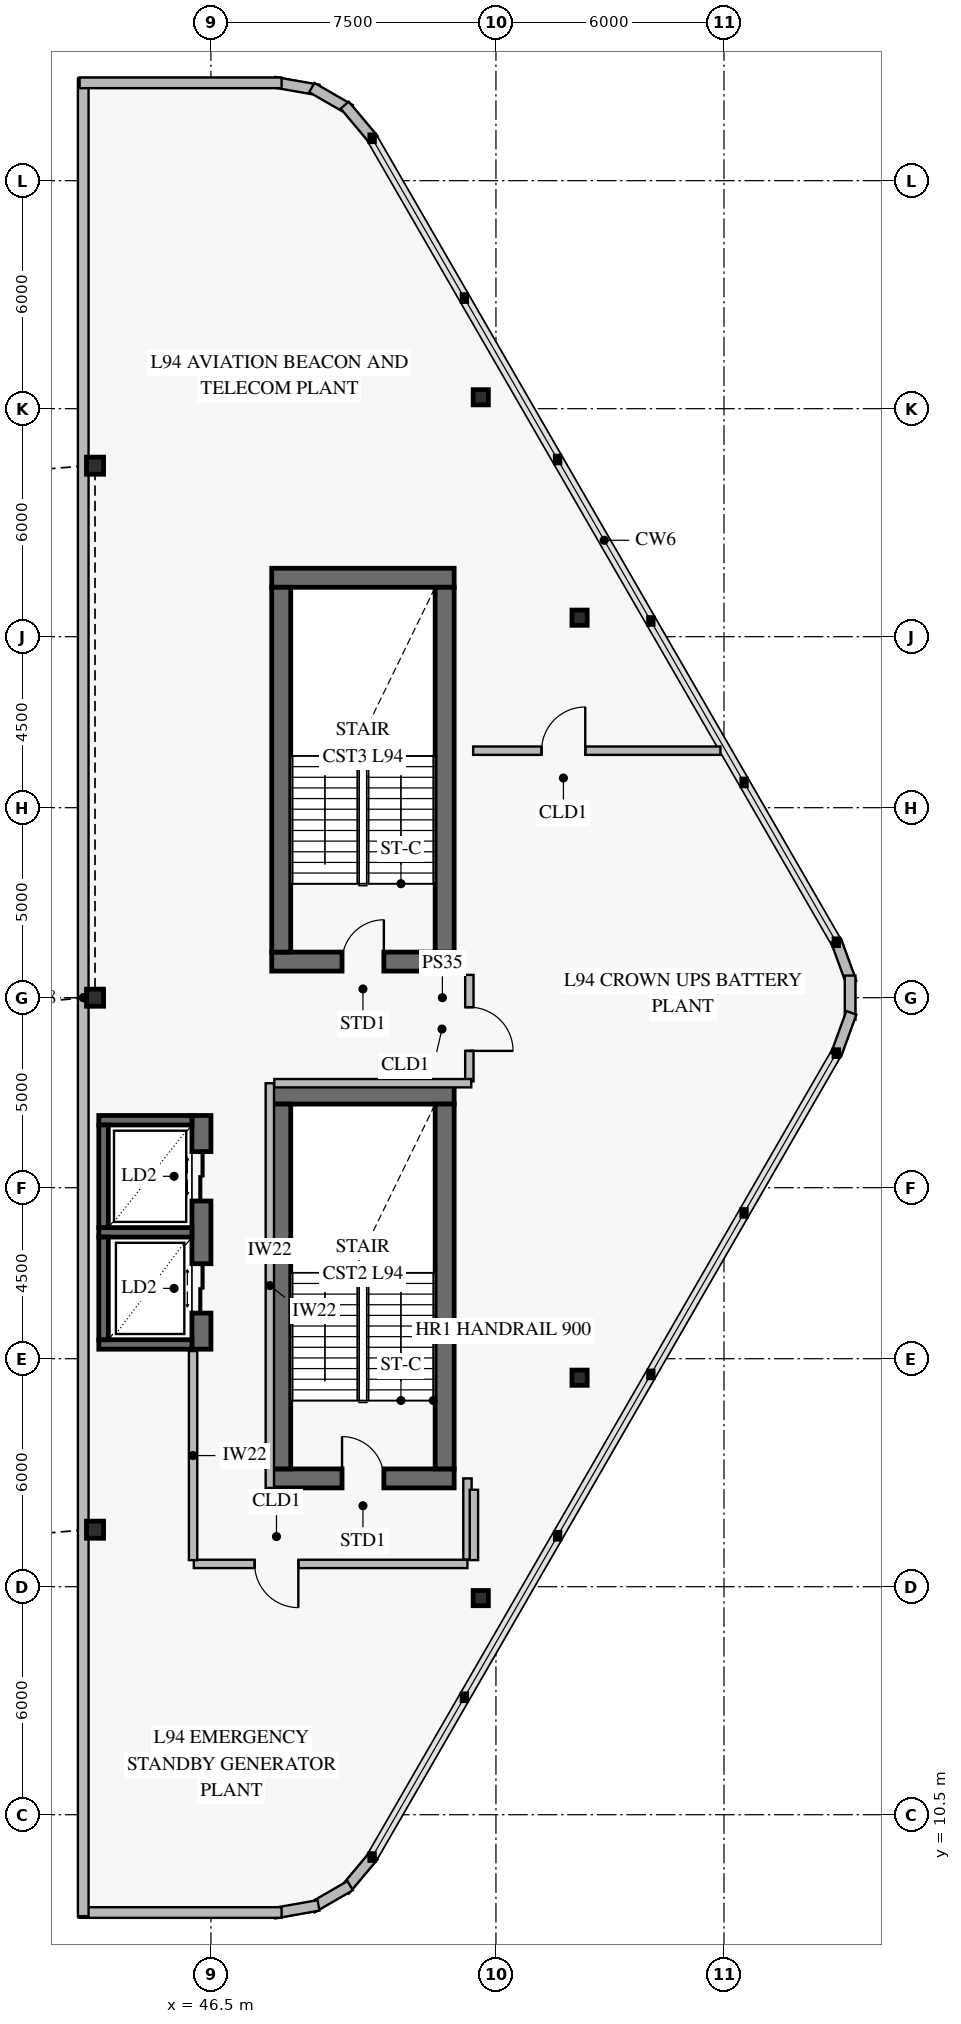
"""IFC4 building model, lengths in metres.
Left out: names, types, materials, properties, quantities, classifications, styles, units other than length and angle.
Written with IfcOpenShell. Run it as: python <this file> out.ifc"""

import sys

from ifc_helpers import new_model, si_unit, direction, frame, frame_2d, origin, origin_2d, place, context, subcontext, project, spatial, rectangle, hollow_rectangle, i_section, extrude, element, fill, save


model = new_model("IFC4")
c1 = context("Model", 3, precision=1e-05, world=origin(), true_north=direction((0.0, 1.0)))
c2 = subcontext(c1, "Body", "Model", "MODEL_VIEW")
j1 = project(units=[si_unit("LENGTHUNIT", "METRE"), si_unit("PLANEANGLEUNIT", "RADIAN")], contexts=[c1])
p1 = place(None, origin())
s1 = spatial("IfcSite", under=j1, at=p1, CompositionType="ELEMENT")
p2 = place(p1, origin())
s2 = spatial("IfcBuilding", under=s1, at=p2, CompositionType="ELEMENT")
p3 = place(p2, frame((0.0, 0.0, 370.2)))
s3 = spatial("IfcBuildingStorey", under=s2, at=p3, CompositionType="ELEMENT", Elevation=370.2)
p4 = place(p3, frame((48.1, 19.35, 0.0), z_axis=(0.0, 0.0, 1.0), x_axis=(1.0, 0.0, 0.0)))
e1 = element("IfcWall", 1, at=p4, inside=s3, PredefinedType="SHEAR", context=c2, shape_type="SweptSolid", body=[
    extrude(rectangle(XDim=4.8, YDim=0.5, at=frame_2d((2.4, 0.0))), origin(), (0.0, 0.0, 1.0), 4.4),
])
p5 = place(p4, frame((1.85, 0.0, 0.0)))
e2 = element("IfcOpeningElement", 2, at=p5, cuts=e1, PredefinedType="OPENING", context=c2, shape_type="SweptSolid", body=[
    extrude(rectangle(XDim=1.1, YDim=2.15, at=frame_2d((0.55, 1.075))), frame((0.0, 0.262, 0.0), z_axis=(0.0, -1.0, 0.0), x_axis=(1.0, 0.0, 0.0)), (0.0, 0.0, 1.0), 0.524),
])
p6 = place(p3, frame((52.9, 29.45, 0.0), z_axis=(0.0, 0.0, 1.0), x_axis=(-1.0, 0.0, 0.0)))
e3 = element("IfcWall", 3, at=p6, inside=s3, PredefinedType="SHEAR", context=c2, shape_type="SweptSolid", body=[
    extrude(rectangle(XDim=4.8, YDim=0.5, at=frame_2d((2.4, 0.0))), origin(), (0.0, 0.0, 1.0), 4.4),
])
for number, where, z_axis, x_axis in (
    (4, (48.35, 19.6, 0.0), (0.0, 0.0, 1.0), (0.0, 1.0, 0.0)),
    (5, (52.65, 29.2, 0.0), (0.0, 0.0, 1.0), (0.0, -1.0, 0.0)),
):
    element("IfcWall", number, at=place(p3, frame(where, z_axis=z_axis, x_axis=x_axis)), inside=s3, PredefinedType="SHEAR", context=c2, shape_type="SweptSolid", body=[
        extrude(rectangle(XDim=9.6, YDim=0.5, at=frame_2d((4.8, 0.0))), origin(), (0.0, 0.0, 1.0), 4.4),
    ])
p7 = place(p3, frame((48.1, 32.95, 0.0), z_axis=(0.0, 0.0, 1.0), x_axis=(1.0, 0.0, 0.0)))
e6 = element("IfcWall", 6, at=p7, inside=s3, PredefinedType="SHEAR", context=c2, shape_type="SweptSolid", body=[
    extrude(rectangle(XDim=4.8, YDim=0.5, at=frame_2d((2.4, 0.0))), origin(), (0.0, 0.0, 1.0), 4.4),
])
p8 = place(p7, frame((1.85, 0.0, 0.0)))
e7 = element("IfcOpeningElement", 7, at=p8, cuts=e6, PredefinedType="OPENING", context=c2, shape_type="SweptSolid", body=[
    extrude(rectangle(XDim=1.1, YDim=2.15, at=frame_2d((0.55, 1.075))), frame((0.0, 0.262, 0.0), z_axis=(0.0, -1.0, 0.0), x_axis=(1.0, 0.0, 0.0)), (0.0, 0.0, 1.0), 0.524),
])
p9 = place(p3, frame((52.9, 43.05, 0.0), z_axis=(0.0, 0.0, 1.0), x_axis=(-1.0, 0.0, 0.0)))
e8 = element("IfcWall", 8, at=p9, inside=s3, PredefinedType="SHEAR", context=c2, shape_type="SweptSolid", body=[
    extrude(rectangle(XDim=4.8, YDim=0.5, at=frame_2d((2.4, 0.0))), origin(), (0.0, 0.0, 1.0), 4.4),
])
for number, where, z_axis, x_axis in (
    (9, (48.35, 33.2, 0.0), (0.0, 0.0, 1.0), (0.0, 1.0, 0.0)),
    (10, (52.65, 42.8, 0.0), (0.0, 0.0, 1.0), (0.0, -1.0, 0.0)),
):
    element("IfcWall", number, at=place(p3, frame(where, z_axis=z_axis, x_axis=x_axis)), inside=s3, PredefinedType="SHEAR", context=c2, shape_type="SweptSolid", body=[
        extrude(rectangle(XDim=9.6, YDim=0.5, at=frame_2d((4.8, 0.0))), origin(), (0.0, 0.0, 1.0), 4.4),
    ])
p10 = place(p3, frame((46.25, 22.75, 0.0), z_axis=(0.0, 0.0, 1.0), x_axis=(0.0, 1.0, 0.0)))
e11 = element("IfcWall", 11, at=p10, inside=s3, PredefinedType="SHEAR", context=c2, shape_type="SweptSolid", body=[
    extrude(rectangle(XDim=6.15, YDim=0.5, at=frame_2d((3.075, 0.0))), origin(), (0.0, 0.0, 1.0), 4.4),
])
p11 = place(p10, frame((0.95, 0.0, 0.0)))
e12 = element("IfcOpeningElement", 12, at=p11, cuts=e11, PredefinedType="OPENING", context=c2, shape_type="SweptSolid", body=[
    extrude(rectangle(XDim=1.3, YDim=2.3, at=frame_2d((0.65, 1.15))), frame((0.0, 0.262, 0.0), z_axis=(0.0, -1.0, 0.0), x_axis=(1.0, 0.0, 0.0)), (0.0, 0.0, 1.0), 0.524),
])
p12 = place(p10, frame((3.9, 0.0, 0.0)))
e13 = element("IfcOpeningElement", 13, at=p12, cuts=e11, PredefinedType="OPENING", context=c2, shape_type="SweptSolid", body=[
    extrude(rectangle(XDim=1.3, YDim=2.3, at=frame_2d((0.65, 1.15))), frame((0.0, 0.262, 0.0), z_axis=(0.0, -1.0, 0.0), x_axis=(1.0, 0.0, 0.0)), (0.0, 0.0, 1.0), 0.524),
])
for number, where, z_axis, x_axis in (
    (14, (56.2, 22.0, 0.0), (0.0, 0.0, 1.0), (1.0, 0.0, 0.0)),
    (15, (56.2, 42.0, 0.0), (0.0, 0.0, 1.0), (1.0, 0.0, 0.0)),
    (16, (53.6, 16.2, 0.0), (0.0, 0.0, 1.0), (1.0, 0.0, 0.0)),
    (17, (53.6, 47.8, 0.0), (0.0, 0.0, 1.0), (1.0, 0.0, 0.0)),
):
    element("IfcColumn", number, at=place(p3, frame(where, z_axis=z_axis, x_axis=x_axis)), inside=s3, PredefinedType="COLUMN", context=c2, shape_type="SweptSolid", body=[
        extrude(i_section(OverallWidth=0.4, OverallDepth=0.4, WebThickness=0.013, FlangeThickness=0.021, at=origin_2d()), origin(), (0.0, 0.0, 1.0), 4.05),
    ])
for number, where, z_axis, x_axis in (
    (18, (43.45, 18.0, 0.0), (0.0, 0.0, 1.0), (1.0, 0.0, 0.0)),
    (19, (43.45, 32.0, 0.0), (0.0, 0.0, 1.0), (1.0, 0.0, 0.0)),
    (20, (43.45, 46.0, 0.0), (0.0, 0.0, 1.0), (1.0, 0.0, 0.0)),
):
    element("IfcColumn", number, at=place(p3, frame(where, z_axis=z_axis, x_axis=x_axis)), inside=s3, PredefinedType="PILASTER", context=c2, shape_type="SweptSolid", body=[
        extrude(hollow_rectangle(XDim=0.45, YDim=0.45, WallThickness=0.022, at=origin_2d()), origin(), (0.0, 0.0, 1.0), 4.05),
    ])
p13 = place(p3, frame((48.171, 56.091, 0.0), z_axis=(0.0, 0.0, 1.0), x_axis=(0.984798162481, -0.173702559495, 0.0)))
e21 = element("IfcWall", 21, at=p13, inside=s3, PredefinedType="SOLIDWALL", context=c2, shape_type="SweptSolid", body=[
    extrude(rectangle(XDim=1.178, YDim=0.28, at=frame_2d((0.589, 0.0))), origin(), (0.0, 0.0, 1.0), 4.05),
])
p14 = place(p3, frame((49.155, 55.95, 0.0), z_axis=(0.0, 0.0, 1.0), x_axis=(0.865951785477, -0.500127488975, 0.0)))
e22 = element("IfcWall", 22, at=p14, inside=s3, PredefinedType="SOLIDWALL", context=c2, shape_type="SweptSolid", body=[
    extrude(rectangle(XDim=1.165, YDim=0.28, at=frame_2d((0.583, 0.0))), origin(), (0.0, 0.0, 1.0), 4.05),
])
for number, where, z_axis, x_axis in (
    (23, (50.021, 55.488, 0.0), (0.0, 0.0, 1.0), (0.643, -0.766, 0.0)),
    (24, (62.948, 33.505, 0.0), (0.0, 0.0, 1.0), (0.342, -0.94, 0.0)),
):
    element("IfcWall", number, at=place(p3, frame(where, z_axis=z_axis, x_axis=x_axis)), inside=s3, PredefinedType="SOLIDWALL", context=c2, shape_type="SweptSolid", body=[
        extrude(rectangle(XDim=1.178, YDim=0.28, at=frame_2d((0.589, 0.0))), origin(), (0.0, 0.0, 1.0), 4.05),
    ])
p15 = place(p3, frame((63.319, 32.583, 0.0), z_axis=(0.0, 0.0, 1.0), x_axis=(0.0, -1.0, 0.0)))
e25 = element("IfcWall", 25, at=p15, inside=s3, PredefinedType="SOLIDWALL", context=c2, shape_type="SweptSolid", body=[
    extrude(rectangle(XDim=1.165, YDim=0.28, at=frame_2d((0.583, 0.0))), origin(), (0.0, 0.0, 1.0), 4.05),
])
for number, where, z_axis, x_axis in (
    (26, (63.351, 31.602, 0.0), (0.0, 0.0, 1.0), (-0.342, -0.94, 0.0)),
    (27, (50.778, 9.414, 0.0), (0.0, 0.0, 1.0), (-0.643, -0.766, 0.0)),
):
    element("IfcWall", number, at=place(p3, frame(where, z_axis=z_axis, x_axis=x_axis)), inside=s3, PredefinedType="SOLIDWALL", context=c2, shape_type="SweptSolid", body=[
        extrude(rectangle(XDim=1.178, YDim=0.28, at=frame_2d((0.589, 0.0))), origin(), (0.0, 0.0, 1.0), 4.05),
    ])
p16 = place(p3, frame((50.164, 8.633, 0.0), z_axis=(0.0, 0.0, 1.0), x_axis=(-0.865951785477, -0.500127488975, 0.0)))
e28 = element("IfcWall", 28, at=p16, inside=s3, PredefinedType="SOLIDWALL", context=c2, shape_type="SweptSolid", body=[
    extrude(rectangle(XDim=1.165, YDim=0.28, at=frame_2d((0.583, 0.0))), origin(), (0.0, 0.0, 1.0), 4.05),
])
p17 = place(p3, frame((49.331, 8.114, 0.0), z_axis=(0.0, 0.0, 1.0), x_axis=(-0.984798162481, -0.173702559495, 0.0)))
e29 = element("IfcWall", 29, at=p17, inside=s3, PredefinedType="SOLIDWALL", context=c2, shape_type="SweptSolid", body=[
    extrude(rectangle(XDim=1.178, YDim=0.28, at=frame_2d((0.589, 0.0))), origin(), (0.0, 0.0, 1.0), 4.05),
])
p18 = place(p3, frame((48.36, 7.926, 0.0), z_axis=(0.0, 0.0, 1.0), x_axis=(-1.0, 0.0, 0.0)))
e30 = element("IfcWall", 30, at=p18, inside=s3, PredefinedType="SOLIDWALL", context=c2, shape_type="SweptSolid", body=[
    extrude(rectangle(XDim=5.315, YDim=0.28, at=frame_2d((2.657, 0.0))), origin(), (0.0, 0.0, 1.0), 4.05),
])
p19 = place(p3, frame((43.14, 7.831, 0.0), z_axis=(0.0, 0.0, 1.0), x_axis=(0.0, 1.0, 0.0)))
e31 = element("IfcWall", 31, at=p19, inside=s3, PredefinedType="SOLIDWALL", context=c2, shape_type="SweptSolid", body=[
    extrude(rectangle(XDim=48.338, YDim=0.28, at=frame_2d((24.169, 0.0))), origin(), (0.0, 0.0, 1.0), 3.465),
])
p20 = place(p3, frame((43.045, 56.074, 0.0), z_axis=(0.0, 0.0, 1.0), x_axis=(1.0, 0.0, 0.0)))
e32 = element("IfcWall", 32, at=p20, inside=s3, PredefinedType="SOLIDWALL", context=c2, shape_type="SweptSolid", body=[
    extrude(rectangle(XDim=5.315, YDim=0.28, at=frame_2d((2.657, 0.0))), origin(), (0.0, 0.0, 1.0), 4.05),
])
for number, where, z_axis, x_axis in (
    (33, (43.55, 22.875, 0.0), (0.0, 0.0, 1.0), (1.0, 0.0, 0.0)),
    (34, (43.55, 25.825, 0.0), (0.0, 0.0, 1.0), (1.0, 0.0, 0.0)),
):
    element("IfcWall", number, at=place(p3, frame(where, z_axis=z_axis, x_axis=x_axis)), inside=s3, PredefinedType="SOLIDWALL", context=c2, shape_type="SweptSolid", body=[
        extrude(rectangle(XDim=2.45, YDim=0.25, at=frame_2d((1.225, 0.0))), origin(), (0.0, 0.0, 1.0), 4.4),
    ])
p21 = place(p3, frame((43.675, 23.0, 0.0), z_axis=(0.0, 0.0, 1.0), x_axis=(0.0, 1.0, 0.0)))
e35 = element("IfcWall", 35, at=p21, inside=s3, PredefinedType="SOLIDWALL", context=c2, shape_type="SweptSolid", body=[
    extrude(rectangle(XDim=2.7, YDim=0.25, at=frame_2d((1.35, 0.0))), origin(), (0.0, 0.0, 1.0), 4.4),
])
p22 = place(p3, frame((43.55, 28.775, 0.0), z_axis=(0.0, 0.0, 1.0), x_axis=(1.0, 0.0, 0.0)))
e36 = element("IfcWall", 36, at=p22, inside=s3, PredefinedType="SOLIDWALL", context=c2, shape_type="SweptSolid", body=[
    extrude(rectangle(XDim=2.45, YDim=0.25, at=frame_2d((1.225, 0.0))), origin(), (0.0, 0.0, 1.0), 4.4),
])
p23 = place(p3, frame((43.675, 25.95, 0.0), z_axis=(0.0, 0.0, 1.0), x_axis=(0.0, 1.0, 0.0)))
e37 = element("IfcWall", 37, at=p23, inside=s3, PredefinedType="SOLIDWALL", context=c2, shape_type="SweptSolid", body=[
    extrude(rectangle(XDim=2.7, YDim=0.25, at=frame_2d((1.35, 0.0))), origin(), (0.0, 0.0, 1.0), 4.4),
])
p24 = place(p3, frame((53.4, 38.5, 0.0), z_axis=(0.0, 0.0, 1.0), x_axis=(1.0, 0.0, 0.0)))
e38 = element("IfcWall", 38, at=p24, inside=s3, PredefinedType="PARTITIONING", context=c2, shape_type="SweptSolid", body=[
    extrude(rectangle(XDim=6.507, YDim=0.22, at=frame_2d((3.253, 0.0))), origin(), (0.0, 0.0, 1.0), 3.47),
])
p25 = place(p24, frame((1.8, 0.0, 0.0)))
e39 = element("IfcOpeningElement", 39, at=p25, cuts=e38, PredefinedType="OPENING", context=c2, shape_type="SweptSolid", body=[
    extrude(rectangle(XDim=1.15, YDim=2.2, at=frame_2d((0.575, 1.1))), frame((0.0, 0.122, 0.0), z_axis=(0.0, -1.0, 0.0), x_axis=(1.0, 0.0, 0.0)), (0.0, 0.0, 1.0), 0.244),
])
p26 = place(p3, frame((46.05, 17.1, 0.0), z_axis=(0.0, 0.0, 1.0), x_axis=(1.0, 0.0, 0.0)))
e40 = element("IfcWall", 40, at=p26, inside=s3, PredefinedType="PARTITIONING", context=c2, shape_type="SweptSolid", body=[
    extrude(rectangle(XDim=7.2, YDim=0.22, at=frame_2d((3.6, 0.0))), origin(), (0.0, 0.0, 1.0), 3.47),
])
p27 = place(p26, frame((1.6, 0.0, 0.0)))
e41 = element("IfcOpeningElement", 41, at=p27, cuts=e40, PredefinedType="OPENING", context=c2, shape_type="SweptSolid", body=[
    extrude(rectangle(XDim=1.15, YDim=2.2, at=frame_2d((0.575, 1.1))), frame((0.0, 0.122, 0.0), z_axis=(0.0, -1.0, 0.0), x_axis=(1.0, 0.0, 0.0)), (0.0, 0.0, 1.0), 0.244),
])
p28 = place(p3, frame((53.3, 29.8, 0.0), z_axis=(0.0, 0.0, 1.0), x_axis=(0.0, 1.0, 0.0)))
e42 = element("IfcWall", 42, at=p28, inside=s3, PredefinedType="PARTITIONING", context=c2, shape_type="SweptSolid", body=[
    extrude(rectangle(XDim=2.8, YDim=0.22, at=frame_2d((1.4, 0.0))), origin(), (0.0, 0.0, 1.0), 4.05),
])
p29 = place(p28, frame((0.8, 0.0, 0.0)))
e43 = element("IfcOpeningElement", 43, at=p29, cuts=e42, PredefinedType="OPENING", context=c2, shape_type="SweptSolid", body=[
    extrude(rectangle(XDim=1.15, YDim=2.2, at=frame_2d((0.575, 1.1))), frame((0.0, 0.122, 0.0), z_axis=(0.0, -1.0, 0.0), x_axis=(1.0, 0.0, 0.0)), (0.0, 0.0, 1.0), 0.244),
])
p30 = place(p3, frame((53.25, 17.218, 0.0), z_axis=(0.0, 0.0, 1.0), x_axis=(0.0, 1.0, 0.0)))
e44 = element("IfcWall", 44, at=p30, inside=s3, PredefinedType="PARTITIONING", context=c2, shape_type="SweptSolid", body=[
    extrude(rectangle(XDim=2.132, YDim=0.22, at=frame_2d((1.066, 0.0))), origin(), (0.0, 0.0, 1.0), 4.05),
])
p31 = place(p3, frame((48.05, 19.1, 0.0), z_axis=(0.0, 0.0, 1.0), x_axis=(0.0, 1.0, 0.0)))
e45 = element("IfcWall", 45, at=p31, inside=s3, PredefinedType="PARTITIONING", context=c2, shape_type="SweptSolid", body=[
    extrude(rectangle(XDim=10.65, YDim=0.22, at=frame_2d((5.325, 0.0))), origin(), (0.0, 0.0, 1.0), 3.47),
])
p32 = place(p3, frame((48.168, 29.75, 0.0), z_axis=(0.0, 0.0, 1.0), x_axis=(1.0, 0.0, 0.0)))
e46 = element("IfcWall", 46, at=p32, inside=s3, PredefinedType="PARTITIONING", context=c2, shape_type="SweptSolid", body=[
    extrude(rectangle(XDim=5.182, YDim=0.22, at=frame_2d((2.591, 0.0))), origin(), (0.0, 0.0, 1.0), 4.05),
])
p33 = place(p3, frame((46.03, 22.701, 0.0), z_axis=(0.0, 0.0, 1.0), x_axis=(0.0, -1.0, 0.0)))
e47 = element("IfcWall", 47, at=p33, inside=s3, PredefinedType="PARTITIONING", context=c2, shape_type="SweptSolid", body=[
    extrude(rectangle(XDim=5.501, YDim=0.22, at=frame_2d((2.751, 0.0))), origin(), (0.0, 0.0, 1.0), 3.47),
])
p34 = place(p3, frame((53.42, 17.2, 0.0), z_axis=(0.0, 0.0, 1.0), x_axis=(0.0, 1.0, 0.0)))
e48 = element("IfcWall", 48, at=p34, inside=s3, PredefinedType="PARTITIONING", context=c2, shape_type="SweptSolid", body=[
    extrude(rectangle(XDim=1.85, YDim=0.22, at=frame_2d((0.925, 0.0))), origin(), (0.0, 0.0, 1.0), 4.05),
])
p35 = place(p5, origin())
e49 = element("IfcDoor", 49, at=p35, inside=s3, OperationType="SINGLE_SWING_LEFT", PredefinedType="USERDEFINED", context=c2, shape_type="SweptSolid", body=[
    extrude(rectangle(XDim=1.1, YDim=2.15, at=frame_2d((0.55, 1.075))), frame((0.0, 0.025, 0.0), z_axis=(0.0, -1.0, 0.0), x_axis=(1.0, 0.0, 0.0)), (0.0, 0.0, 1.0), 0.05),
])
fill(e2, e49)
p36 = place(p8, origin())
e50 = element("IfcDoor", 50, at=p36, inside=s3, OperationType="SINGLE_SWING_RIGHT", PredefinedType="USERDEFINED", context=c2, shape_type="SweptSolid", body=[
    extrude(rectangle(XDim=1.1, YDim=2.15, at=frame_2d((0.55, 1.075))), frame((0.0, 0.025, 0.0), z_axis=(0.0, -1.0, 0.0), x_axis=(1.0, 0.0, 0.0)), (0.0, 0.0, 1.0), 0.05),
])
fill(e7, e50)
p37 = place(p11, frame((1.3, 0.0, 0.0), z_axis=(0.0, 0.0, 1.0), x_axis=(-1.0, 0.0, 0.0)))
e51 = element("IfcDoor", 51, at=p37, inside=s3, OperationType="DOUBLE_DOOR_SLIDING", PredefinedType="DOOR", context=c2, shape_type="SweptSolid", body=[
    extrude(rectangle(XDim=1.3, YDim=2.3, at=frame_2d((0.65, 1.15))), frame((0.0, 0.025, 0.0), z_axis=(0.0, -1.0, 0.0), x_axis=(1.0, 0.0, 0.0)), (0.0, 0.0, 1.0), 0.05),
])
fill(e12, e51)
p38 = place(p12, frame((1.3, 0.0, 0.0), z_axis=(0.0, 0.0, 1.0), x_axis=(-1.0, 0.0, 0.0)))
e52 = element("IfcDoor", 52, at=p38, inside=s3, OperationType="DOUBLE_DOOR_SLIDING", PredefinedType="DOOR", context=c2, shape_type="SweptSolid", body=[
    extrude(rectangle(XDim=1.3, YDim=2.3, at=frame_2d((0.65, 1.15))), frame((0.0, 0.025, 0.0), z_axis=(0.0, -1.0, 0.0), x_axis=(1.0, 0.0, 0.0)), (0.0, 0.0, 1.0), 0.05),
])
fill(e13, e52)
p39 = place(p25, origin())
e53 = element("IfcDoor", 53, at=p39, inside=s3, OperationType="SINGLE_SWING_RIGHT", PredefinedType="DOOR", context=c2, shape_type="SweptSolid", body=[
    extrude(rectangle(XDim=1.15, YDim=2.2, at=frame_2d((0.575, 1.1))), frame((0.0, 0.025, 0.0), z_axis=(0.0, -1.0, 0.0), x_axis=(1.0, 0.0, 0.0)), (0.0, 0.0, 1.0), 0.05),
])
fill(e39, e53)
p40 = place(p27, frame((1.15, 0.0, 0.0), z_axis=(0.0, 0.0, 1.0), x_axis=(-1.0, 0.0, 0.0)))
e54 = element("IfcDoor", 54, at=p40, inside=s3, OperationType="SINGLE_SWING_LEFT", PredefinedType="DOOR", context=c2, shape_type="SweptSolid", body=[
    extrude(rectangle(XDim=1.15, YDim=2.2, at=frame_2d((0.575, 1.1))), frame((0.0, 0.025, 0.0), z_axis=(0.0, -1.0, 0.0), x_axis=(1.0, 0.0, 0.0)), (0.0, 0.0, 1.0), 0.05),
])
fill(e41, e54)
p41 = place(p29, frame((1.15, 0.0, 0.0), z_axis=(0.0, 0.0, 1.0), x_axis=(-1.0, 0.0, 0.0)))
e55 = element("IfcDoor", 55, at=p41, inside=s3, OperationType="SINGLE_SWING_RIGHT", PredefinedType="DOOR", context=c2, shape_type="SweptSolid", body=[
    extrude(rectangle(XDim=1.15, YDim=2.2, at=frame_2d((0.575, 1.1))), frame((0.0, 0.025, 0.0), z_axis=(0.0, -1.0, 0.0), x_axis=(1.0, 0.0, 0.0)), (0.0, 0.0, 1.0), 0.05),
])
fill(e43, e55)
save(model, sys.argv[1])
